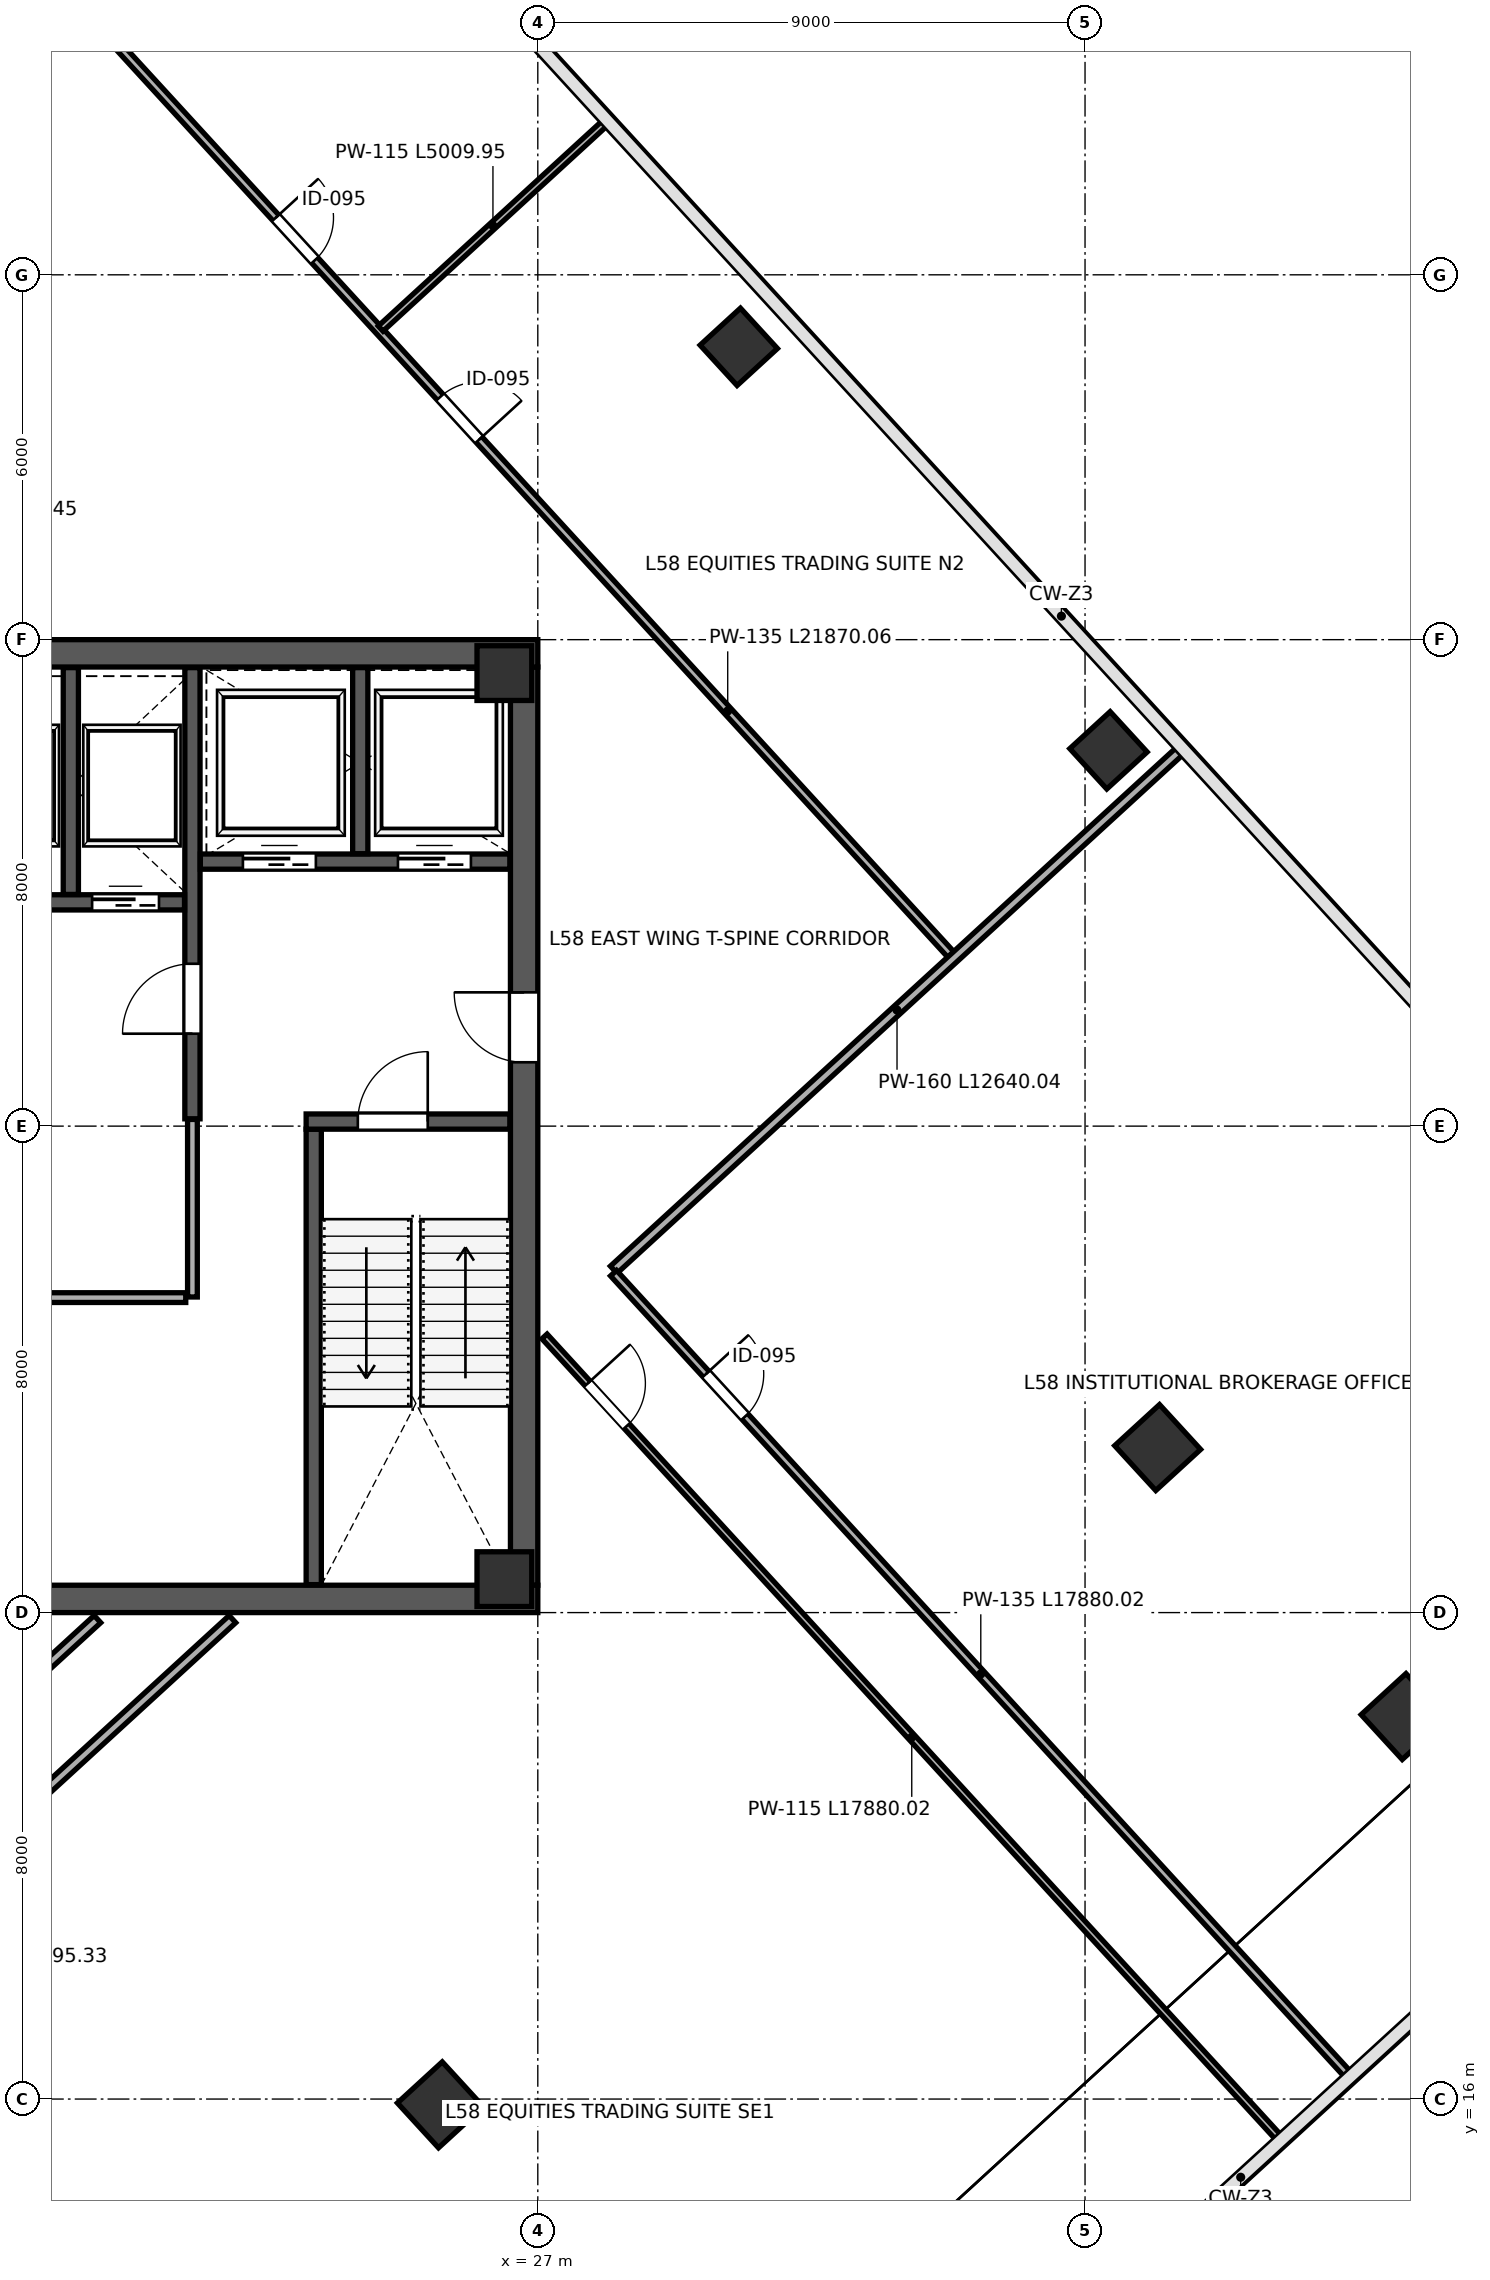
"""IFC4 building model, lengths in metres.
Left out: names, types, materials, properties, quantities, classifications, styles, units other than length and angle.
Written with IfcOpenShell. Run it as: python <this file> out.ifc"""

import sys

from ifc_helpers import new_model, si_unit, direction, frame, frame_2d, origin, origin_2d, place, context, subcontext, project, spatial, rectangle, extrude, source, transform, mapped, element, fill, save


model = new_model("IFC4")
c1 = context("Model", 3, precision=1e-05, world=origin(), true_north=direction((0.0, 1.0)))
c2 = subcontext(c1, "Body", "Model", "MODEL_VIEW")
j1 = project(units=[si_unit("LENGTHUNIT", "METRE"), si_unit("PLANEANGLEUNIT", "RADIAN")], contexts=[c1])
p1 = place(None, origin())
s1 = spatial("IfcSite", under=j1, at=p1, CompositionType="ELEMENT")
p2 = place(p1, origin())
s2 = spatial("IfcBuilding", under=s1, at=p2, CompositionType="ELEMENT")
p3 = place(p2, frame((0.0, 0.0, 258.4)))
s3 = spatial("IfcBuildingStorey", under=s2, at=p3, CompositionType="ELEMENT", Elevation=258.4)
m1 = source(origin(), c2, "Body", "SweptSolid", [
    extrude(rectangle(XDim=0.9, YDim=0.9, at=origin_2d()), origin(), (0.0, 0.0, 1.0), 4.199),
])
for number, where, z_axis, x_axis in (
    (1, (26.45, 24.55, 0.001), (0.0, 0.0, 1.0), (1.0, 0.0, 0.0)),
    (2, (26.45, 39.45, 0.001), (0.0, 0.0, 1.0), (1.0, 0.0, 0.0)),
):
    element("IfcColumn", number, at=place(p3, frame(where, z_axis=z_axis, x_axis=x_axis)), inside=s3, PredefinedType="COLUMN", context=c2, shape_type="MappedRepresentation", body=[
        mapped(m1, transform((0.0, 0.0, 0.0), scale=1.0)),
    ])
m2 = source(origin(), c2, "Body", "SweptSolid", [
    extrude(rectangle(XDim=0.9, YDim=0.9, at=origin_2d()), origin(), (0.0, 0.0, 1.0), 4.199),
])
for number, where, z_axis, x_axis in (
    (3, (30.305, 44.816, 0.001), (0.0, 0.0, 1.0), (-0.676, 0.737, 0.0)),
    (4, (36.385, 38.18, 0.001), (0.0, 0.0, 1.0), (-0.676, 0.737, 0.0)),
):
    element("IfcColumn", number, at=place(p3, frame(where, z_axis=z_axis, x_axis=x_axis)), inside=s3, PredefinedType="COLUMN", context=c2, shape_type="MappedRepresentation", body=[
        mapped(m2, transform((0.0, 0.0, 0.0), scale=1.0)),
    ])
m3 = source(origin(), c2, "Body", "SweptSolid", [
    extrude(rectangle(XDim=1.0, YDim=1.0, at=origin_2d()), origin(), (0.0, 0.0, 1.0), 4.199),
])
for number, where, z_axis, x_axis in (
    (5, (25.398, 15.905, 0.001), (0.0, 0.0, 1.0), (-0.676, 0.737, 0.0)),
    (6, (37.194, 26.714, 0.001), (0.0, 0.0, 1.0), (-0.676, 0.737, 0.0)),
):
    element("IfcColumn", number, at=place(p3, frame(where, z_axis=z_axis, x_axis=x_axis)), inside=s3, PredefinedType="COLUMN", context=c2, shape_type="MappedRepresentation", body=[
        mapped(m3, transform((0.0, 0.0, 0.0), scale=1.0)),
    ])
m4 = source(origin(), c2, "Body", "SweptSolid", [
    extrude(rectangle(XDim=1.0, YDim=1.0, at=origin_2d()), origin(), (0.0, 0.0, 1.0), 4.199),
])
p4 = place(p3, frame((41.248, 22.291, 0.001), z_axis=(0.0, 0.0, 1.0), x_axis=(-0.675590207616, 0.73727733681, 0.0)))
e7 = element("IfcColumn", 7, at=p4, inside=s3, PredefinedType="COLUMN", context=c2, shape_type="MappedRepresentation", body=[
    mapped(m4, transform((0.0, 0.0, 0.0), scale=1.0)),
])
p5 = place(p3, frame((26.775, 24.45, 0.0), z_axis=(0.0, 0.0, 1.0), x_axis=(0.0, 1.0, 0.0)))
e8 = element("IfcWall", 8, at=p5, inside=s3, PredefinedType="SHEAR", context=c2, shape_type="SweptSolid", body=[
    extrude(rectangle(XDim=15.1, YDim=0.45, at=frame_2d((7.55, 0.0))), origin(), (0.0, 0.0, 1.0), 3.96),
])
p6 = place(p5, frame((8.6, 0.0, 0.0)))
e9 = element("IfcOpeningElement", 9, at=p6, cuts=e8, PredefinedType="OPENING", context=c2, shape_type="SweptSolid", body=[
    extrude(rectangle(XDim=1.15, YDim=2.2, at=frame_2d((0.575, 1.1))), frame((0.0, 0.235, 0.0), z_axis=(0.0, -1.0, 0.0), x_axis=(1.0, 0.0, 0.0)), (0.0, 0.0, 1.0), 0.47),
])
for number, where, z_axis, x_axis in (
    (10, (9.0, 24.225, 0.0), (0.0, 0.0, 1.0), (1.0, 0.0, 0.0)),
    (11, (9.0, 39.775, 0.0), (0.0, 0.0, 1.0), (1.0, 0.0, 0.0)),
):
    element("IfcWall", number, at=place(p3, frame(where, z_axis=z_axis, x_axis=x_axis)), inside=s3, PredefinedType="SHEAR", context=c2, shape_type="SweptSolid", body=[
        extrude(rectangle(XDim=18.0, YDim=0.45, at=frame_2d((9.0, 0.0))), origin(), (0.0, 0.0, 1.0), 3.96),
    ])
p7 = place(p3, frame((23.315, 24.46, 0.0), z_axis=(0.0, 0.0, 1.0), x_axis=(0.0, 1.0, 0.0)))
e12 = element("IfcWall", 12, at=p7, inside=s3, PredefinedType="SHEAR", context=c2, shape_type="SweptSolid", body=[
    extrude(rectangle(XDim=7.49, YDim=0.25, at=frame_2d((3.745, 0.0))), origin(), (0.0, 0.0, 1.0), 3.96),
])
p8 = place(p3, frame((23.19, 32.075, 0.0), z_axis=(0.0, 0.0, 1.0), x_axis=(1.0, 0.0, 0.0)))
e13 = element("IfcWall", 13, at=p8, inside=s3, PredefinedType="SHEAR", context=c2, shape_type="SweptSolid", body=[
    extrude(rectangle(XDim=3.35, YDim=0.25, at=frame_2d((1.675, 0.0))), origin(), (0.0, 0.0, 1.0), 3.96),
])
p9 = place(p8, frame((0.85, 0.0, 0.0)))
e14 = element("IfcOpeningElement", 14, at=p9, cuts=e13, PredefinedType="OPENING", context=c2, shape_type="SweptSolid", body=[
    extrude(rectangle(XDim=1.15, YDim=2.2, at=frame_2d((0.575, 1.1))), frame((0.0, 0.135, 0.0), z_axis=(0.0, -1.0, 0.0), x_axis=(1.0, 0.0, 0.0)), (0.0, 0.0, 1.0), 0.27),
])
p10 = place(p3, frame((21.32, 32.12, 0.0), z_axis=(0.0, 0.0, 1.0), x_axis=(0.0, 1.0, 0.0)))
e15 = element("IfcWall", 15, at=p10, inside=s3, PredefinedType="SHEAR", context=c2, shape_type="SweptSolid", body=[
    extrude(rectangle(XDim=7.42, YDim=0.25, at=frame_2d((3.71, 0.0))), origin(), (0.0, 0.0, 1.0), 3.96),
])
p11 = place(p10, frame((1.4, 0.0, 0.0)))
e16 = element("IfcOpeningElement", 16, at=p11, cuts=e15, PredefinedType="OPENING", context=c2, shape_type="SweptSolid", body=[
    extrude(rectangle(XDim=1.15, YDim=2.2, at=frame_2d((0.575, 1.1))), frame((0.0, 0.135, 0.0), z_axis=(0.0, -1.0, 0.0), x_axis=(1.0, 0.0, 0.0)), (0.0, 0.0, 1.0), 0.27),
])
p12 = place(p3, frame((21.45, 36.35, 0.0), z_axis=(0.0, 0.0, 1.0), x_axis=(1.0, 0.0, 0.0)))
e17 = element("IfcWall", 17, at=p12, inside=s3, PredefinedType="SHEAR", context=c2, shape_type="SweptSolid", body=[
    extrude(rectangle(XDim=5.09, YDim=0.25, at=frame_2d((2.545, 0.0))), origin(), (0.0, 0.0, 1.0), 3.96),
])
p13 = place(p12, frame((0.7, 0.0, 0.0)))
e18 = element("IfcOpeningElement", 18, at=p13, cuts=e17, PredefinedType="OPENING", context=c2, shape_type="SweptSolid", body=[
    extrude(rectangle(XDim=1.2, YDim=2.2, at=frame_2d((0.6, 1.1))), frame((0.0, 0.135, 0.0), z_axis=(0.0, -1.0, 0.0), x_axis=(1.0, 0.0, 0.0)), (0.0, 0.0, 1.0), 0.27),
])
p14 = place(p12, frame((3.25, 0.0, 0.0)))
e19 = element("IfcOpeningElement", 19, at=p14, cuts=e17, PredefinedType="OPENING", context=c2, shape_type="SweptSolid", body=[
    extrude(rectangle(XDim=1.2, YDim=2.2, at=frame_2d((0.6, 1.1))), frame((0.0, 0.135, 0.0), z_axis=(0.0, -1.0, 0.0), x_axis=(1.0, 0.0, 0.0)), (0.0, 0.0, 1.0), 0.27),
])
p15 = place(p3, frame((24.08, 36.48, 0.0), z_axis=(0.0, 0.0, 1.0), x_axis=(0.0, 1.0, 0.0)))
e20 = element("IfcWall", 20, at=p15, inside=s3, PredefinedType="SHEAR", context=c2, shape_type="SweptSolid", body=[
    extrude(rectangle(XDim=3.06, YDim=0.25, at=frame_2d((1.53, 0.0))), origin(), (0.0, 0.0, 1.0), 3.96),
])
p16 = place(p3, frame((17.32, 35.68, 0.0), z_axis=(0.0, 0.0, 1.0), x_axis=(1.0, 0.0, 0.0)))
e21 = element("IfcWall", 21, at=p16, inside=s3, PredefinedType="SHEAR", context=c2, shape_type="SweptSolid", body=[
    extrude(rectangle(XDim=3.87, YDim=0.25, at=frame_2d((1.935, 0.0))), origin(), (0.0, 0.0, 1.0), 3.96),
])
p17 = place(p16, frame((0.45, 0.0, 0.0)))
e22 = element("IfcOpeningElement", 22, at=p17, cuts=e21, PredefinedType="OPENING", context=c2, shape_type="SweptSolid", body=[
    extrude(rectangle(XDim=1.1, YDim=2.2, at=frame_2d((0.55, 1.1))), frame((0.0, 0.135, 0.0), z_axis=(0.0, -1.0, 0.0), x_axis=(1.0, 0.0, 0.0)), (0.0, 0.0, 1.0), 0.27),
])
p18 = place(p16, frame((2.35, 0.0, 0.0)))
e23 = element("IfcOpeningElement", 23, at=p18, cuts=e21, PredefinedType="OPENING", context=c2, shape_type="SweptSolid", body=[
    extrude(rectangle(XDim=1.1, YDim=2.2, at=frame_2d((0.55, 1.1))), frame((0.0, 0.135, 0.0), z_axis=(0.0, -1.0, 0.0), x_axis=(1.0, 0.0, 0.0)), (0.0, 0.0, 1.0), 0.27),
])
p19 = place(p3, frame((19.32, 35.81, 0.0), z_axis=(0.0, 0.0, 1.0), x_axis=(0.0, 1.0, 0.0)))
e24 = element("IfcWall", 24, at=p19, inside=s3, PredefinedType="SHEAR", context=c2, shape_type="SweptSolid", body=[
    extrude(rectangle(XDim=3.73, YDim=0.25, at=frame_2d((1.865, 0.0))), origin(), (0.0, 0.0, 1.0), 3.96),
])
p20 = place(p3, frame((12.84, 29.18, 0.0), z_axis=(0.0, 0.0, 1.0), x_axis=(1.0, 0.0, 0.0)))
e25 = element("IfcWall", 25, at=p20, inside=s3, PredefinedType="PARTITIONING", context=c2, shape_type="SweptSolid", body=[
    extrude(rectangle(XDim=8.37, YDim=0.16, at=frame_2d((4.185, 0.0))), origin(), (0.0, 0.0, 1.0), 3.96),
])
p21 = place(p20, frame((2.6, 0.0, 0.0)))
e26 = element("IfcOpeningElement", 26, at=p21, cuts=e25, PredefinedType="OPENING", context=c2, shape_type="SweptSolid", body=[
    extrude(rectangle(XDim=0.9, YDim=2.15, at=frame_2d((0.45, 1.075))), frame((0.0, 0.09, 0.0), z_axis=(0.0, -1.0, 0.0), x_axis=(1.0, 0.0, 0.0)), (0.0, 0.0, 1.0), 0.18),
])
p22 = place(p3, frame((21.32, 29.19, 0.0), z_axis=(0.0, 0.0, 1.0), x_axis=(0.0, 1.0, 0.0)))
e27 = element("IfcWall", 27, at=p22, inside=s3, PredefinedType="PARTITIONING", context=c2, shape_type="SweptSolid", body=[
    extrude(rectangle(XDim=2.92, YDim=0.16, at=frame_2d((1.46, 0.0))), origin(), (0.0, 0.0, 1.0), 3.96),
])
p23 = place(p3, frame((13.765, 18.402, 0.0), z_axis=(0.0, 0.0, 1.0), x_axis=(0.737266340408, 0.675602207887, 0.0)))
e28 = element("IfcWall", 28, at=p23, inside=s3, PredefinedType="PARTITIONING", context=c2, shape_type="SweptSolid", body=[
    extrude(rectangle(XDim=8.128, YDim=0.16, at=frame_2d((4.064, 0.0))), origin(), (0.0, 0.0, 1.0), 3.96),
])
p24 = place(p3, frame((19.042, 50.92, 0.0), z_axis=(0.0, 0.0, 1.0), x_axis=(0.675589646996, -0.737277850523, 0.0)))
e29 = element("IfcWall", 29, at=p24, inside=s3, PredefinedType="PARTITIONING", context=c2, shape_type="SweptSolid", body=[
    extrude(rectangle(XDim=21.87, YDim=0.135, at=frame_2d((10.935, 0.0))), origin(), (0.0, 0.0, 1.0), 3.96),
])
p25 = place(p24, frame((5.4, 0.0, 0.0)))
e30 = element("IfcOpeningElement", 30, at=p25, cuts=e29, PredefinedType="OPENING", context=c2, shape_type="SweptSolid", body=[
    extrude(rectangle(XDim=0.95, YDim=2.15, at=frame_2d((0.475, 1.075))), frame((0.0, 0.078, 0.0), z_axis=(0.0, -1.0, 0.0), x_axis=(1.0, 0.0, 0.0)), (0.0, 0.0, 1.0), 0.155),
])
p26 = place(p24, frame((9.4, 0.0, 0.0)))
e31 = element("IfcOpeningElement", 31, at=p26, cuts=e29, PredefinedType="OPENING", context=c2, shape_type="SweptSolid", body=[
    extrude(rectangle(XDim=0.95, YDim=2.15, at=frame_2d((0.475, 1.075))), frame((0.0, 0.078, 0.0), z_axis=(0.0, -1.0, 0.0), x_axis=(1.0, 0.0, 0.0)), (0.0, 0.0, 1.0), 0.155),
])
p27 = place(p3, frame((24.415, 45.115, 0.0), z_axis=(0.0, 0.0, 1.0), x_axis=(0.737279537385, 0.675587806101, 0.0)))
e32 = element("IfcWall", 32, at=p27, inside=s3, PredefinedType="PARTITIONING", context=c2, shape_type="SweptSolid", body=[
    extrude(rectangle(XDim=5.01, YDim=0.115, at=frame_2d((2.505, 0.0))), origin(), (0.0, 0.0, 1.0), 3.295),
])
p28 = place(p3, frame((1.393, 34.124, 0.0), z_axis=(0.0, 0.0, 1.0), x_axis=(0.737274323436, 0.675593496121, 0.0)))
e33 = element("IfcWall", 33, at=p28, inside=s3, PredefinedType="PARTITIONING", context=c2, shape_type="SweptSolid", body=[
    extrude(rectangle(XDim=27.402, YDim=0.135, at=frame_2d((13.701, 0.0))), origin(), (0.0, 0.0, 1.0), 3.96),
])
p29 = place(p3, frame((28.248, 29.639, 0.0), z_axis=(0.0, 0.0, 1.0), x_axis=(0.73728000412, 0.675587296746, 0.0)))
e34 = element("IfcWall", 34, at=p29, inside=s3, PredefinedType="PARTITIONING", context=c2, shape_type="SweptSolid", body=[
    extrude(rectangle(XDim=12.64, YDim=0.16, at=frame_2d((6.32, 0.0))), origin(), (0.0, 0.0, 1.0), 3.295),
])
p30 = place(p3, frame((12.47, 15.181, 0.0), z_axis=(0.0, 0.0, 1.0), x_axis=(0.737265724175, 0.675602880365, 0.0)))
e35 = element("IfcWall", 35, at=p30, inside=s3, PredefinedType="PARTITIONING", context=c2, shape_type="SweptSolid", body=[
    extrude(rectangle(XDim=12.895, YDim=0.16, at=frame_2d((6.448, 0.0))), origin(), (0.0, 0.0, 1.0), 3.96),
])
p31 = place(p3, frame((28.246, 29.582, 0.0), z_axis=(0.0, 0.0, 1.0), x_axis=(0.67559539026, -0.737272587758, 0.0)))
e36 = element("IfcWall", 36, at=p31, inside=s3, PredefinedType="PARTITIONING", context=c2, shape_type="SweptSolid", body=[
    extrude(rectangle(XDim=17.88, YDim=0.135, at=frame_2d((8.94, 0.0))), origin(), (0.0, 0.0, 1.0), 3.253),
])
p32 = place(p31, frame((2.25, 0.0, 0.0)))
e37 = element("IfcOpeningElement", 37, at=p32, cuts=e36, PredefinedType="OPENING", context=c2, shape_type="SweptSolid", body=[
    extrude(rectangle(XDim=0.95, YDim=2.15, at=frame_2d((0.475, 1.075))), frame((0.0, 0.078, 0.0), z_axis=(0.0, -1.0, 0.0), x_axis=(1.0, 0.0, 0.0)), (0.0, 0.0, 1.0), 0.155),
])
p33 = place(p3, frame((27.11, 28.542, 0.0), z_axis=(0.0, 0.0, 1.0), x_axis=(0.675588589041, -0.737278819957, 0.0)))
e38 = element("IfcWall", 38, at=p33, inside=s3, PredefinedType="PARTITIONING", context=c2, shape_type="SweptSolid", body=[
    extrude(rectangle(XDim=17.88, YDim=0.115, at=frame_2d((8.94, 0.0))), origin(), (0.0, 0.0, 1.0), 3.253),
])
p34 = place(p33, frame((1.05, 0.0, 0.0)))
e39 = element("IfcOpeningElement", 39, at=p34, cuts=e38, PredefinedType="OPENING", context=c2, shape_type="SweptSolid", body=[
    extrude(rectangle(XDim=0.95, YDim=2.15, at=frame_2d((0.475, 1.075))), frame((0.0, 0.067, 0.0), z_axis=(0.0, -1.0, 0.0), x_axis=(1.0, 0.0, 0.0)), (0.0, 0.0, 1.0), 0.135),
])
m5 = source(origin(), c2, "Body", "SweptSolid", [
    extrude(rectangle(XDim=1.15, YDim=2.2, at=frame_2d((0.575, 1.1))), frame((0.0, 0.025, 0.0), z_axis=(0.0, -1.0, 0.0), x_axis=(1.0, 0.0, 0.0)), (0.0, 0.0, 1.0), 0.05),
])
p35 = place(p11, origin())
e40 = element("IfcDoor", 40, at=p35, inside=s3, OperationType="SINGLE_SWING_LEFT", PredefinedType="DOOR", context=c2, shape_type="MappedRepresentation", body=[
    mapped(m5, transform((0.0, 0.0, 0.0), scale=1.0)),
])
fill(e16, e40)
m6 = source(origin(), c2, "Body", "SweptSolid", [
    extrude(rectangle(XDim=1.15, YDim=2.2, at=frame_2d((0.575, 1.1))), frame((0.0, 0.025, 0.0), z_axis=(0.0, -1.0, 0.0), x_axis=(1.0, 0.0, 0.0)), (0.0, 0.0, 1.0), 0.05),
])
p36 = place(p9, origin())
e41 = element("IfcDoor", 41, at=p36, inside=s3, OperationType="SINGLE_SWING_RIGHT", PredefinedType="DOOR", context=c2, shape_type="MappedRepresentation", body=[
    mapped(m6, transform((0.0, 0.0, 0.0), scale=1.0)),
])
fill(e14, e41)
p37 = place(p6, origin())
e42 = element("IfcDoor", 42, at=p37, inside=s3, OperationType="SINGLE_SWING_RIGHT", PredefinedType="DOOR", context=c2, shape_type="MappedRepresentation", body=[
    mapped(m5, transform((0.0, 0.0, 0.0), scale=1.0)),
])
fill(e9, e42)
m7 = source(origin(), c2, "Body", "SweptSolid", [
    extrude(rectangle(XDim=1.1, YDim=2.2, at=frame_2d((0.55, 1.1))), frame((0.0, 0.025, 0.0), z_axis=(0.0, -1.0, 0.0), x_axis=(1.0, 0.0, 0.0)), (0.0, 0.0, 1.0), 0.05),
])
p38 = place(p18, origin())
e43 = element("IfcDoor", 43, at=p38, inside=s3, OperationType="SLIDING_TO_RIGHT", PredefinedType="DOOR", context=c2, shape_type="MappedRepresentation", body=[
    mapped(m7, transform((0.0, 0.0, 0.0), scale=1.0)),
])
fill(e23, e43)
m8 = source(origin(), c2, "Body", "SweptSolid", [
    extrude(rectangle(XDim=1.2, YDim=2.2, at=frame_2d((0.6, 1.1))), frame((0.0, 0.025, 0.0), z_axis=(0.0, -1.0, 0.0), x_axis=(1.0, 0.0, 0.0)), (0.0, 0.0, 1.0), 0.05),
])
p39 = place(p13, origin())
e44 = element("IfcDoor", 44, at=p39, inside=s3, OperationType="SLIDING_TO_LEFT", PredefinedType="DOOR", context=c2, shape_type="MappedRepresentation", body=[
    mapped(m8, transform((0.0, 0.0, 0.0), scale=1.0)),
])
fill(e18, e44)
p40 = place(p14, origin())
e45 = element("IfcDoor", 45, at=p40, inside=s3, OperationType="SLIDING_TO_RIGHT", PredefinedType="DOOR", context=c2, shape_type="MappedRepresentation", body=[
    mapped(m8, transform((0.0, 0.0, 0.0), scale=1.0)),
])
fill(e19, e45)
m9 = source(origin(), c2, "Body", "SweptSolid", [
    extrude(rectangle(XDim=0.95, YDim=2.15, at=frame_2d((0.475, 1.075))), frame((0.0, 0.025, 0.0), z_axis=(0.0, -1.0, 0.0), x_axis=(1.0, 0.0, 0.0)), (0.0, 0.0, 1.0), 0.05),
])
p41 = place(p25, origin())
e46 = element("IfcDoor", 46, at=p41, inside=s3, OperationType="SINGLE_SWING_LEFT", PredefinedType="DOOR", context=c2, shape_type="MappedRepresentation", body=[
    mapped(m9, transform((0.0, 0.0, 0.0), scale=1.0)),
])
fill(e30, e46)
p42 = place(p26, origin())
e47 = element("IfcDoor", 47, at=p42, inside=s3, OperationType="SINGLE_SWING_RIGHT", PredefinedType="DOOR", context=c2, shape_type="MappedRepresentation", body=[
    mapped(m9, transform((0.0, 0.0, 0.0), scale=1.0)),
])
fill(e31, e47)
p43 = place(p32, origin())
e48 = element("IfcDoor", 48, at=p43, inside=s3, OperationType="SINGLE_SWING_LEFT", PredefinedType="DOOR", context=c2, shape_type="MappedRepresentation", body=[
    mapped(m9, transform((0.0, 0.0, 0.0), scale=1.0)),
])
fill(e37, e48)
p44 = place(p34, origin())
e49 = element("IfcDoor", 49, at=p44, inside=s3, OperationType="SINGLE_SWING_LEFT", PredefinedType="DOOR", context=c2, shape_type="MappedRepresentation", body=[
    mapped(m9, transform((0.0, 0.0, 0.0), scale=1.0)),
])
fill(e39, e49)
save(model, sys.argv[1])
